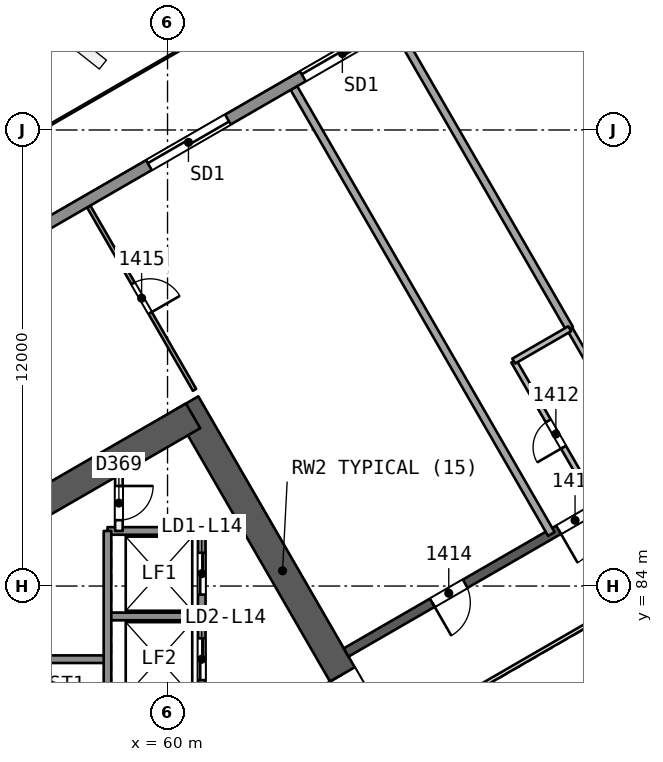
"""IFC4 building model, lengths in metres.
Left out: names, types, materials, properties, quantities, classifications, styles, units other than length and angle.
Written with IfcOpenShell. Run it as: python <this file> out.ifc"""

import sys

from ifc_helpers import new_model, si_unit, direction, frame, frame_2d, origin, place, context, subcontext, project, spatial, rectangle, extrude, element, fill, save


model = new_model("IFC4")
c1 = context("Model", 3, precision=1e-05, world=origin(), true_north=direction((0.0, 1.0)))
c2 = subcontext(c1, "Body", "Model", "MODEL_VIEW")
j1 = project(units=[si_unit("LENGTHUNIT", "METRE"), si_unit("PLANEANGLEUNIT", "RADIAN")], contexts=[c1])
p1 = place(None, origin())
s1 = spatial("IfcSite", under=j1, at=p1, CompositionType="ELEMENT")
p2 = place(p1, origin())
s2 = spatial("IfcBuilding", under=s1, at=p2, CompositionType="ELEMENT")
p3 = place(p2, frame((0.0, 0.0, 64.7)))
s3 = spatial("IfcBuildingStorey", under=s2, at=p3, CompositionType="ELEMENT", Elevation=64.7)
p4 = place(p3, frame((65.567, 80.0, 0.0), z_axis=(0.0, 0.0, 1.0), x_axis=(-0.499988615364, 0.866031976607, 0.0)))
e1 = element("IfcWall", 1, at=p4, inside=s3, PredefinedType="SHEAR", context=c2, shape_type="SweptSolid", body=[
    extrude(rectangle(XDim=10.163, YDim=0.75, at=frame_2d((5.082, 0.0))), origin(), (0.0, 0.0, 1.0), 3.7),
])
p5 = place(p4, frame((0.733, 0.0, 0.0)))
e2 = element("IfcOpeningElement", 2, at=p5, cuts=e1, PredefinedType="OPENING", context=c2, shape_type="SweptSolid", body=[
    extrude(rectangle(XDim=1.2, YDim=2.1, at=frame_2d((0.6, 1.05))), frame((0.0, 0.385, 0.0), z_axis=(0.0, -1.0, 0.0), x_axis=(1.0, 0.0, 0.0)), (0.0, 0.0, 1.0), 0.771),
])
p6 = place(p3, frame((60.673, 88.477, 0.0), z_axis=(0.0, 0.0, 1.0), x_axis=(-0.8660248072, -0.500001033313, 0.0)))
e3 = element("IfcWall", 3, at=p6, inside=s3, PredefinedType="SHEAR", context=c2, shape_type="SweptSolid", body=[
    extrude(rectangle(XDim=13.958, YDim=0.75, at=frame_2d((6.979, 0.0))), origin(), (0.0, 0.0, 1.0), 3.7),
])
p7 = place(p3, frame((78.2, 90.046, 0.0), z_axis=(0.0, 0.0, 1.0), x_axis=(-0.866026492143, -0.499998114903, 0.0)))
e4 = element("IfcWall", 4, at=p7, inside=s3, PredefinedType="SHEAR", context=c2, shape_type="SweptSolid", body=[
    extrude(rectangle(XDim=15.588, YDim=0.25, at=frame_2d((7.794, 0.0))), origin(), (0.0, 0.0, 1.0), 3.2),
])
p8 = place(p7, frame((2.618, 0.0, 0.0)))
e5 = element("IfcOpeningElement", 5, at=p8, cuts=e4, PredefinedType="OPENING", context=c2, shape_type="SweptSolid", body=[
    extrude(rectangle(XDim=1.0, YDim=2.1, at=frame_2d((0.5, 1.05))), frame((0.0, 0.135, 0.0), z_axis=(0.0, -1.0, 0.0), x_axis=(1.0, 0.0, 0.0)), (0.0, 0.0, 1.0), 0.271),
])
p9 = place(p7, frame((8.133, 0.0, 0.0)))
e6 = element("IfcOpeningElement", 6, at=p9, cuts=e4, PredefinedType="OPENING", context=c2, shape_type="SweptSolid", body=[
    extrude(rectangle(XDim=1.0, YDim=2.1, at=frame_2d((0.5, 1.05))), frame((0.0, 0.135, 0.0), z_axis=(0.0, -1.0, 0.0), x_axis=(1.0, 0.0, 0.0)), (0.0, 0.0, 1.0), 0.271),
])
p10 = place(p7, frame((11.971, 0.0, 0.0)))
e7 = element("IfcOpeningElement", 7, at=p10, cuts=e4, PredefinedType="OPENING", context=c2, shape_type="SweptSolid", body=[
    extrude(rectangle(XDim=1.0, YDim=2.1, at=frame_2d((0.5, 1.05))), frame((0.0, 0.135, 0.0), z_axis=(0.0, -1.0, 0.0), x_axis=(1.0, 0.0, 0.0)), (0.0, 0.0, 1.0), 0.271),
])
p11 = place(p3, frame((66.025, 98.663, 0.0), z_axis=(0.0, 0.0, 1.0), x_axis=(0.499999124091, -0.86602590949, 0.0)))
e8 = element("IfcWall", 8, at=p11, inside=s3, PredefinedType="PARTITIONING", context=c2, shape_type="SweptSolid", body=[
    extrude(rectangle(XDim=9.115, YDim=0.2, at=frame_2d((4.558, 0.0))), origin(), (0.0, 0.0, 1.0), 3.2),
])
p12 = place(p3, frame((70.582, 90.769, 0.0), z_axis=(0.0, 0.0, 1.0), x_axis=(0.500022631915, -0.866012336848, 0.0)))
e9 = element("IfcWall", 9, at=p12, inside=s3, PredefinedType="PARTITIONING", context=c2, shape_type="SweptSolid", body=[
    extrude(rectangle(XDim=4.435, YDim=0.15, at=frame_2d((2.218, 0.0))), origin(), (0.0, 0.0, 1.0), 3.2),
])
p13 = place(p3, frame((71.328, 86.078, 0.0), z_axis=(0.0, 0.0, 1.0), x_axis=(-0.499981348214, 0.86603617213, 0.0)))
e10 = element("IfcWall", 10, at=p13, inside=s3, PredefinedType="PARTITIONING", context=c2, shape_type="SweptSolid", body=[
    extrude(rectangle(XDim=4.435, YDim=0.15, at=frame_2d((2.218, 0.0))), origin(), (0.0, 0.0, 1.0), 3.2),
])
p14 = place(p13, frame((1.818, 0.0, 0.0)))
e11 = element("IfcOpeningElement", 11, at=p14, cuts=e10, PredefinedType="OPENING", context=c2, shape_type="SweptSolid", body=[
    extrude(rectangle(XDim=0.8, YDim=2.1, at=frame_2d((0.4, 1.05))), frame((0.0, 0.085, 0.0), z_axis=(0.0, -1.0, 0.0), x_axis=(1.0, 0.0, 0.0)), (0.0, 0.0, 1.0), 0.171),
])
p15 = place(p3, frame((69.11, 89.919, 0.0), z_axis=(0.0, 0.0, 1.0), x_axis=(0.865989465428, 0.500062241894, 0.0)))
e12 = element("IfcWall", 12, at=p15, inside=s3, PredefinedType="PARTITIONING", context=c2, shape_type="SweptSolid", body=[
    extrude(rectangle(XDim=1.7, YDim=0.15, at=frame_2d((0.85, 0.0))), origin(), (0.0, 0.0, 1.0), 3.2),
])
p16 = place(p3, frame((63.325, 97.104, 0.0), z_axis=(0.0, 0.0, 1.0), x_axis=(0.500006818652, -0.866021466998, 0.0)))
e13 = element("IfcWall", 13, at=p16, inside=s3, PredefinedType="PARTITIONING", context=c2, shape_type="SweptSolid", body=[
    extrude(rectangle(XDim=13.551, YDim=0.2, at=frame_2d((6.775, 0.0))), origin(), (0.0, 0.0, 1.0), 3.2),
])
p17 = place(p3, frame((57.925, 93.987, 0.0), z_axis=(0.0, 0.0, 1.0), x_axis=(0.499994302092, -0.866028693448, 0.0)))
e14 = element("IfcWall", 14, at=p17, inside=s3, PredefinedType="PARTITIONING", context=c2, shape_type="SweptSolid", body=[
    extrude(rectangle(XDim=5.571, YDim=0.1, at=frame_2d((2.786, 0.0))), origin(), (0.0, 0.0, 1.0), 3.2),
])
p18 = place(p17, frame((2.336, 0.0, 0.0)))
e15 = element("IfcOpeningElement", 15, at=p18, cuts=e14, PredefinedType="OPENING", context=c2, shape_type="SweptSolid", body=[
    extrude(rectangle(XDim=0.9, YDim=2.1, at=frame_2d((0.45, 1.05))), frame((0.0, 0.061, 0.0), z_axis=(0.0, -1.0, 0.0), x_axis=(1.0, 0.0, 0.0)), (0.0, 0.0, 1.0), 0.121),
])
p19 = place(p3, frame((38.701, 83.06, 0.0), z_axis=(0.0, 0.0, 1.0), x_axis=(0.866026049211, 0.499998882086, 0.0)))
e16 = element("IfcWall", 16, at=p19, inside=s3, PredefinedType="SOLIDWALL", context=c2, shape_type="SweptSolid", body=[
    extrude(rectangle(XDim=59.811, YDim=0.3, at=frame_2d((29.905, 0.0))), origin(), (0.0, 0.0, 1.0), 3.2),
])
p20 = place(p19, frame((33.382, 0.0, 0.0)))
e17 = element("IfcOpeningElement", 17, at=p20, cuts=e16, PredefinedType="OPENING", context=c2, shape_type="SweptSolid", body=[
    extrude(rectangle(XDim=2.4, YDim=2.4, at=frame_2d((1.2, 1.2))), frame((0.0, 0.161, 0.0), z_axis=(0.0, -1.0, 0.0), x_axis=(1.0, 0.0, 0.0)), (0.0, 0.0, 1.0), 0.321),
])
p21 = place(p19, frame((46.394, 0.0, 0.0)))
e18 = element("IfcOpeningElement", 18, at=p21, cuts=e16, PredefinedType="OPENING", context=c2, shape_type="SweptSolid", body=[
    extrude(rectangle(XDim=2.4, YDim=2.4, at=frame_2d((1.2, 1.2))), frame((0.0, 0.161, 0.0), z_axis=(0.0, -1.0, 0.0), x_axis=(1.0, 0.0, 0.0)), (0.0, 0.0, 1.0), 0.321),
])
p22 = place(p19, frame((24.029, 0.0, 0.0)))
e19 = element("IfcOpeningElement", 19, at=p22, cuts=e16, PredefinedType="OPENING", context=c2, shape_type="SweptSolid", body=[
    extrude(rectangle(XDim=2.4, YDim=2.4, at=frame_2d((1.2, 1.2))), frame((0.0, 0.161, 0.0), z_axis=(0.0, -1.0, 0.0), x_axis=(1.0, 0.0, 0.0)), (0.0, 0.0, 1.0), 0.321),
])
p23 = place(p19, frame((11.002, 0.0, 0.0)))
e20 = element("IfcOpeningElement", 20, at=p23, cuts=e16, PredefinedType="OPENING", context=c2, shape_type="SweptSolid", body=[
    extrude(rectangle(XDim=2.4, YDim=2.4, at=frame_2d((1.2, 1.2))), frame((0.0, 0.161, 0.0), z_axis=(0.0, -1.0, 0.0), x_axis=(1.0, 0.0, 0.0)), (0.0, 0.0, 1.0), 0.321),
])
p24 = place(p19, frame((28.705, 0.0, 0.0)))
e21 = element("IfcOpeningElement", 21, at=p24, cuts=e16, PredefinedType="OPENING", context=c2, shape_type="SweptSolid", body=[
    extrude(rectangle(XDim=2.4, YDim=2.4, at=frame_2d((1.2, 1.2))), frame((0.0, 0.161, 0.0), z_axis=(0.0, -1.0, 0.0), x_axis=(1.0, 0.0, 0.0)), (0.0, 0.0, 1.0), 0.321),
])
for number, where, z_axis, x_axis in (
    (22, (60.9, 85.45, 0.0), (0.0, 0.0, 1.0), (-1.0, 0.0, 0.0)),
    (23, (60.9, 83.2, 0.0), (0.0, 0.0, 1.0), (-1.0, 0.0, 0.0)),
):
    element("IfcWall", number, at=place(p3, frame(where, z_axis=z_axis, x_axis=x_axis)), inside=s3, PredefinedType="SOLIDWALL", context=c2, shape_type="SweptSolid", body=[
        extrude(rectangle(XDim=2.48, YDim=0.2, at=frame_2d((1.24, 0.0))), origin(), (0.0, 0.0, 1.0), 3.2),
    ])
p25 = place(p3, frame((58.42, 82.075, 0.0), z_axis=(0.0, 0.0, 1.0), x_axis=(-1.0, 0.0, 0.0)))
e24 = element("IfcWall", 24, at=p25, inside=s3, PredefinedType="SOLIDWALL", context=c2, shape_type="SweptSolid", body=[
    extrude(rectangle(XDim=7.7, YDim=0.2, at=frame_2d((3.85, 0.0))), origin(), (0.0, 0.0, 1.0), 3.2),
])
p26 = place(p3, frame((60.9, 85.45, 0.0), z_axis=(0.0, 0.0, 1.0), x_axis=(0.0, -1.0, 0.0)))
e25 = element("IfcWall", 25, at=p26, inside=s3, PredefinedType="SOLIDWALL", context=c2, shape_type="SweptSolid", body=[
    extrude(rectangle(XDim=10.9, YDim=0.2, at=frame_2d((5.45, 0.0))), origin(), (0.0, 0.0, 1.0), 3.2),
])
p27 = place(p26, frame((0.575, 0.0, 0.0)))
e26 = element("IfcOpeningElement", 26, at=p27, cuts=e25, PredefinedType="OPENING", context=c2, shape_type="SweptSolid", body=[
    extrude(rectangle(XDim=1.1, YDim=2.1, at=frame_2d((0.55, 1.05))), frame((0.0, 0.11, 0.0), z_axis=(0.0, -1.0, 0.0), x_axis=(1.0, 0.0, 0.0)), (0.0, 0.0, 1.0), 0.221),
])
p28 = place(p26, frame((2.825, 0.0, 0.0)))
e27 = element("IfcOpeningElement", 27, at=p28, cuts=e25, PredefinedType="OPENING", context=c2, shape_type="SweptSolid", body=[
    extrude(rectangle(XDim=1.1, YDim=2.1, at=frame_2d((0.55, 1.05))), frame((0.0, 0.11, 0.0), z_axis=(0.0, -1.0, 0.0), x_axis=(1.0, 0.0, 0.0)), (0.0, 0.0, 1.0), 0.221),
])
p29 = place(p26, frame((5.075, 0.0, 0.0)))
e28 = element("IfcOpeningElement", 28, at=p29, cuts=e25, PredefinedType="OPENING", context=c2, shape_type="SweptSolid", body=[
    extrude(rectangle(XDim=1.1, YDim=2.1, at=frame_2d((0.55, 1.05))), frame((0.0, 0.11, 0.0), z_axis=(0.0, -1.0, 0.0), x_axis=(1.0, 0.0, 0.0)), (0.0, 0.0, 1.0), 0.221),
])
p30 = place(p26, frame((7.325, 0.0, 0.0)))
e29 = element("IfcOpeningElement", 29, at=p30, cuts=e25, PredefinedType="OPENING", context=c2, shape_type="SweptSolid", body=[
    extrude(rectangle(XDim=1.1, YDim=2.1, at=frame_2d((0.55, 1.05))), frame((0.0, 0.11, 0.0), z_axis=(0.0, -1.0, 0.0), x_axis=(1.0, 0.0, 0.0)), (0.0, 0.0, 1.0), 0.221),
])
p31 = place(p3, frame((58.72, 86.917, 0.0), z_axis=(0.0, 0.0, 1.0), x_axis=(0.0, -1.0, 0.0)))
e30 = element("IfcWall", 30, at=p31, inside=s3, PredefinedType="PARTITIONING", context=c2, shape_type="SweptSolid", body=[
    extrude(rectangle(XDim=1.467, YDim=0.2, at=frame_2d((0.733, 0.0))), origin(), (0.0, 0.0, 1.0), 3.2),
])
p32 = place(p31, frame((0.283, 0.0, 0.0)))
e31 = element("IfcOpeningElement", 31, at=p32, cuts=e30, PredefinedType="OPENING", context=c2, shape_type="SweptSolid", body=[
    extrude(rectangle(XDim=0.9, YDim=2.1, at=frame_2d((0.45, 1.05))), frame((0.0, 0.11, 0.0), z_axis=(0.0, -1.0, 0.0), x_axis=(1.0, 0.0, 0.0)), (0.0, 0.0, 1.0), 0.221),
])
p33 = place(p3, frame((58.42, 85.45, 0.0), z_axis=(0.0, 0.0, 1.0), x_axis=(0.0, -1.0, 0.0)))
e32 = element("IfcWall", 32, at=p33, inside=s3, PredefinedType="SOLIDWALL", context=c2, shape_type="SweptSolid", body=[
    extrude(rectangle(XDim=9.0, YDim=0.2, at=frame_2d((4.5, 0.0))), origin(), (0.0, 0.0, 1.0), 3.2),
])
p34 = place(p3, frame((77.738, 86.846, 0.0), z_axis=(0.0, 0.0, 1.0), x_axis=(-0.866026658274, -0.499997827154, 0.0)))
e33 = element("IfcWall", 33, at=p34, inside=s3, PredefinedType="PARTITIONING", context=c2, shape_type="SweptSolid", body=[
    extrude(rectangle(XDim=11.588, YDim=0.1, at=frame_2d((5.794, 0.0))), origin(), (0.0, 0.0, 1.0), 3.2),
])
p35 = place(p14, origin())
e34 = element("IfcDoor", 34, at=p35, inside=s3, OperationType="SINGLE_SWING_LEFT", PredefinedType="NOTDEFINED", context=c2, shape_type="SweptSolid", body=[
    extrude(rectangle(XDim=0.8, YDim=2.1, at=frame_2d((0.4, 1.05))), frame((0.0, 0.025, 0.0), z_axis=(0.0, -1.0, 0.0), x_axis=(1.0, 0.0, 0.0)), (0.0, 0.0, 1.0), 0.05),
])
fill(e11, e34)
p36 = place(p9, origin())
e35 = element("IfcDoor", 35, at=p36, inside=s3, OperationType="SINGLE_SWING_RIGHT", PredefinedType="NOTDEFINED", context=c2, shape_type="SweptSolid", body=[
    extrude(rectangle(XDim=1.0, YDim=2.1, at=frame_2d((0.5, 1.05))), frame((0.0, 0.025, 0.0), z_axis=(0.0, -1.0, 0.0), x_axis=(1.0, 0.0, 0.0)), (0.0, 0.0, 1.0), 0.05),
])
fill(e6, e35)
p37 = place(p10, origin())
e36 = element("IfcDoor", 36, at=p37, inside=s3, OperationType="SINGLE_SWING_RIGHT", PredefinedType="NOTDEFINED", context=c2, shape_type="SweptSolid", body=[
    extrude(rectangle(XDim=1.0, YDim=2.1, at=frame_2d((0.5, 1.05))), frame((0.0, 0.025, 0.0), z_axis=(0.0, -1.0, 0.0), x_axis=(1.0, 0.0, 0.0)), (0.0, 0.0, 1.0), 0.05),
])
fill(e7, e36)
p38 = place(p18, origin())
e37 = element("IfcDoor", 37, at=p38, inside=s3, OperationType="SINGLE_SWING_RIGHT", PredefinedType="NOTDEFINED", context=c2, shape_type="SweptSolid", body=[
    extrude(rectangle(XDim=0.9, YDim=2.1, at=frame_2d((0.45, 1.05))), frame((0.0, 0.025, 0.0), z_axis=(0.0, -1.0, 0.0), x_axis=(1.0, 0.0, 0.0)), (0.0, 0.0, 1.0), 0.05),
])
fill(e15, e37)
p39 = place(p22, origin())
e38 = element("IfcDoor", 38, at=p39, inside=s3, OperationType="SLIDING_TO_LEFT", PredefinedType="NOTDEFINED", context=c2, shape_type="SweptSolid", body=[
    extrude(rectangle(XDim=2.4, YDim=2.4, at=frame_2d((1.2, 1.2))), frame((0.0, 0.025, 0.0), z_axis=(0.0, -1.0, 0.0), x_axis=(1.0, 0.0, 0.0)), (0.0, 0.0, 1.0), 0.05),
])
fill(e19, e38)
p40 = place(p24, origin())
e39 = element("IfcDoor", 39, at=p40, inside=s3, OperationType="SLIDING_TO_LEFT", PredefinedType="NOTDEFINED", context=c2, shape_type="SweptSolid", body=[
    extrude(rectangle(XDim=2.4, YDim=2.4, at=frame_2d((1.2, 1.2))), frame((0.0, 0.025, 0.0), z_axis=(0.0, -1.0, 0.0), x_axis=(1.0, 0.0, 0.0)), (0.0, 0.0, 1.0), 0.05),
])
fill(e21, e39)
p41 = place(p5, origin())
e40 = element("IfcDoor", 40, at=p41, inside=s3, OperationType="SINGLE_SWING_RIGHT", PredefinedType="NOTDEFINED", context=c2, shape_type="SweptSolid", body=[
    extrude(rectangle(XDim=1.2, YDim=2.1, at=frame_2d((0.6, 1.05))), frame((0.0, 0.025, 0.0), z_axis=(0.0, -1.0, 0.0), x_axis=(1.0, 0.0, 0.0)), (0.0, 0.0, 1.0), 0.05),
])
fill(e2, e40)
p42 = place(p27, origin())
e41 = element("IfcDoor", 41, at=p42, inside=s3, OperationType="SLIDING_TO_RIGHT", PredefinedType="NOTDEFINED", context=c2, shape_type="SweptSolid", body=[
    extrude(rectangle(XDim=1.1, YDim=2.1, at=frame_2d((0.55, 1.05))), frame((0.0, 0.025, 0.0), z_axis=(0.0, -1.0, 0.0), x_axis=(1.0, 0.0, 0.0)), (0.0, 0.0, 1.0), 0.05),
])
fill(e26, e41)
p43 = place(p28, origin())
e42 = element("IfcDoor", 42, at=p43, inside=s3, OperationType="SLIDING_TO_LEFT", PredefinedType="NOTDEFINED", context=c2, shape_type="SweptSolid", body=[
    extrude(rectangle(XDim=1.1, YDim=2.1, at=frame_2d((0.55, 1.05))), frame((0.0, 0.025, 0.0), z_axis=(0.0, -1.0, 0.0), x_axis=(1.0, 0.0, 0.0)), (0.0, 0.0, 1.0), 0.05),
])
fill(e27, e42)
p44 = place(p32, origin())
e43 = element("IfcDoor", 43, at=p44, inside=s3, OperationType="SINGLE_SWING_LEFT", PredefinedType="NOTDEFINED", context=c2, shape_type="SweptSolid", body=[
    extrude(rectangle(XDim=0.9, YDim=2.1, at=frame_2d((0.45, 1.05))), frame((0.0, 0.025, 0.0), z_axis=(0.0, -1.0, 0.0), x_axis=(1.0, 0.0, 0.0)), (0.0, 0.0, 1.0), 0.05),
])
fill(e31, e43)
save(model, sys.argv[1])
